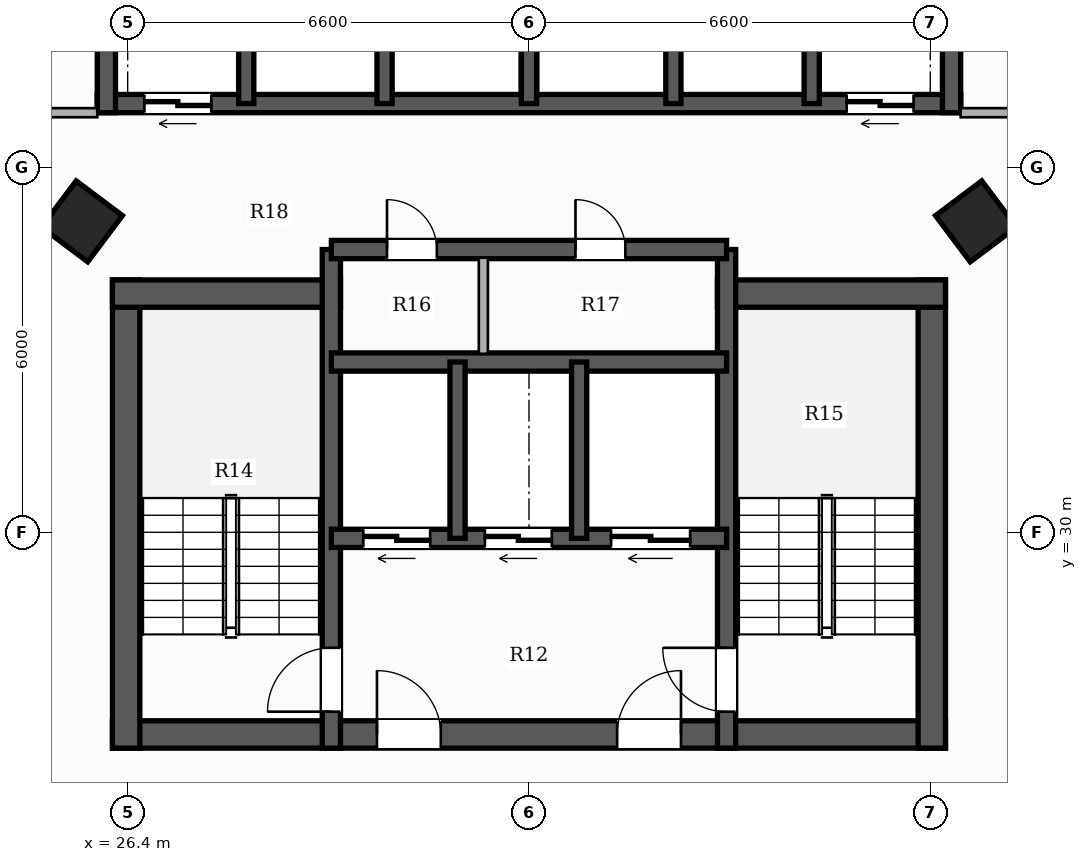
"""IFC4 building model, lengths in metres.
Left out: names, types, materials, properties, quantities, classifications, styles, units other than length and angle.
Written with IfcOpenShell. Run it as: python <this file> out.ifc"""

import sys

from ifc_helpers import new_model, si_unit, direction, frame, frame_2d, origin, origin_2d, place, context, subcontext, project, spatial, rectangle, hollow_rectangle, extrude, element, fill, save


model = new_model("IFC4")
c1 = context("Model", 3, precision=1e-05, world=origin(), true_north=direction((0.0, 1.0)))
c2 = subcontext(c1, "Body", "Model", "MODEL_VIEW")
j1 = project(units=[si_unit("LENGTHUNIT", "METRE"), si_unit("PLANEANGLEUNIT", "RADIAN")], contexts=[c1])
p1 = place(None, origin())
s1 = spatial("IfcSite", under=j1, at=p1, CompositionType="ELEMENT")
p2 = place(p1, origin())
s2 = spatial("IfcBuilding", under=s1, at=p2, CompositionType="ELEMENT")
p3 = place(p2, frame((0.0, 0.0, 84.05)))
s3 = spatial("IfcBuildingStorey", under=s2, at=p3, CompositionType="ELEMENT", Elevation=84.05)
p4 = place(p3, frame((26.15, 26.675, 0.0), z_axis=(0.0, 0.0, 1.0), x_axis=(1.0, 0.0, 0.0)))
e1 = element("IfcWall", 1, at=p4, inside=s3, PredefinedType="SHEAR", context=c2, shape_type="SweptSolid", body=[
    extrude(rectangle(XDim=13.7, YDim=0.45, at=frame_2d((6.85, 0.0))), origin(), (0.0, 0.0, 1.0), 3.3),
])
p5 = place(p4, frame((4.35, 0.0, 0.0)))
e2 = element("IfcOpeningElement", 2, at=p5, cuts=e1, PredefinedType="OPENING", context=c2, shape_type="SweptSolid", body=[
    extrude(rectangle(XDim=1.05, YDim=2.15, at=frame_2d((0.525, 1.075))), frame((0.0, 0.235, 0.0), z_axis=(0.0, -1.0, 0.0), x_axis=(1.0, 0.0, 0.0)), (0.0, 0.0, 1.0), 0.47),
])
p6 = place(p4, frame((8.3, 0.0, 0.0)))
e3 = element("IfcOpeningElement", 3, at=p6, cuts=e1, PredefinedType="OPENING", context=c2, shape_type="SweptSolid", body=[
    extrude(rectangle(XDim=1.05, YDim=2.15, at=frame_2d((0.525, 1.075))), frame((0.0, 0.235, 0.0), z_axis=(0.0, -1.0, 0.0), x_axis=(1.0, 0.0, 0.0)), (0.0, 0.0, 1.0), 0.47),
])
p7 = place(p3, frame((26.375, 26.45, 0.0), z_axis=(0.0, 0.0, 1.0), x_axis=(0.0, 1.0, 0.0)))
e4 = element("IfcWall", 4, at=p7, inside=s3, PredefinedType="SHEAR", context=c2, shape_type="SweptSolid", body=[
    extrude(rectangle(XDim=7.7, YDim=0.45, at=frame_2d((3.85, 0.0))), origin(), (0.0, 0.0, 1.0), 3.3),
])
p8 = place(p3, frame((26.15, 33.925, 0.0), z_axis=(0.0, 0.0, 1.0), x_axis=(1.0, 0.0, 0.0)))
e5 = element("IfcWall", 5, at=p8, inside=s3, PredefinedType="SHEAR", context=c2, shape_type="SweptSolid", body=[
    extrude(rectangle(XDim=3.75, YDim=0.45, at=frame_2d((1.875, 0.0))), origin(), (0.0, 0.0, 1.0), 3.3),
])
p9 = place(p3, frame((39.625, 26.45, 0.0), z_axis=(0.0, 0.0, 1.0), x_axis=(0.0, 1.0, 0.0)))
e6 = element("IfcWall", 6, at=p9, inside=s3, PredefinedType="SHEAR", context=c2, shape_type="SweptSolid", body=[
    extrude(rectangle(XDim=7.7, YDim=0.45, at=frame_2d((3.85, 0.0))), origin(), (0.0, 0.0, 1.0), 3.3),
])
p10 = place(p3, frame((36.1, 33.925, 0.0), z_axis=(0.0, 0.0, 1.0), x_axis=(1.0, 0.0, 0.0)))
e7 = element("IfcWall", 7, at=p10, inside=s3, PredefinedType="SHEAR", context=c2, shape_type="SweptSolid", body=[
    extrude(rectangle(XDim=3.75, YDim=0.45, at=frame_2d((1.875, 0.0))), origin(), (0.0, 0.0, 1.0), 3.3),
])
p11 = place(p3, frame((29.75, 26.45, 0.0), z_axis=(0.0, 0.0, 1.0), x_axis=(0.0, 1.0, 0.0)))
e8 = element("IfcWall", 8, at=p11, inside=s3, PredefinedType="SHEAR", context=c2, shape_type="SweptSolid", body=[
    extrude(rectangle(XDim=8.2, YDim=0.3, at=frame_2d((4.1, 0.0))), origin(), (0.0, 0.0, 1.0), 3.3),
])
p12 = place(p11, frame((0.6, 0.0, 0.0)))
e9 = element("IfcOpeningElement", 9, at=p12, cuts=e8, PredefinedType="OPENING", context=c2, shape_type="SweptSolid", body=[
    extrude(rectangle(XDim=1.05, YDim=2.15, at=frame_2d((0.525, 1.075))), frame((0.0, 0.16, 0.0), z_axis=(0.0, -1.0, 0.0), x_axis=(1.0, 0.0, 0.0)), (0.0, 0.0, 1.0), 0.32),
])
p13 = place(p3, frame((36.25, 26.45, 0.0), z_axis=(0.0, 0.0, 1.0), x_axis=(0.0, 1.0, 0.0)))
e10 = element("IfcWall", 10, at=p13, inside=s3, PredefinedType="SHEAR", context=c2, shape_type="SweptSolid", body=[
    extrude(rectangle(XDim=8.2, YDim=0.3, at=frame_2d((4.1, 0.0))), origin(), (0.0, 0.0, 1.0), 3.3),
])
p14 = place(p13, frame((0.6, 0.0, 0.0)))
e11 = element("IfcOpeningElement", 11, at=p14, cuts=e10, PredefinedType="OPENING", context=c2, shape_type="SweptSolid", body=[
    extrude(rectangle(XDim=1.05, YDim=2.15, at=frame_2d((0.525, 1.075))), frame((0.0, 0.16, 0.0), z_axis=(0.0, -1.0, 0.0), x_axis=(1.0, 0.0, 0.0)), (0.0, 0.0, 1.0), 0.32),
])
p15 = place(p3, frame((36.25, 29.9, 0.0), z_axis=(0.0, 0.0, 1.0), x_axis=(-1.0, 0.0, 0.0)))
e12 = element("IfcWall", 12, at=p15, inside=s3, PredefinedType="SHEAR", context=c2, shape_type="SweptSolid", body=[
    extrude(rectangle(XDim=6.5, YDim=0.3, at=frame_2d((3.25, 0.0))), origin(), (0.0, 0.0, 1.0), 3.3),
])
p16 = place(p15, frame((4.875, 0.0, 0.0)))
e13 = element("IfcOpeningElement", 13, at=p16, cuts=e12, PredefinedType="OPENING", context=c2, shape_type="SweptSolid", body=[
    extrude(rectangle(XDim=1.1, YDim=2.2, at=frame_2d((0.55, 1.1))), frame((0.0, 0.16, 0.0), z_axis=(0.0, -1.0, 0.0), x_axis=(1.0, 0.0, 0.0)), (0.0, 0.0, 1.0), 0.32),
])
p17 = place(p15, frame((2.875, 0.0, 0.0)))
e14 = element("IfcOpeningElement", 14, at=p17, cuts=e12, PredefinedType="OPENING", context=c2, shape_type="SweptSolid", body=[
    extrude(rectangle(XDim=1.1, YDim=2.2, at=frame_2d((0.55, 1.1))), frame((0.0, 0.16, 0.0), z_axis=(0.0, -1.0, 0.0), x_axis=(1.0, 0.0, 0.0)), (0.0, 0.0, 1.0), 0.32),
])
p18 = place(p15, frame((0.6, 0.0, 0.0)))
e15 = element("IfcOpeningElement", 15, at=p18, cuts=e12, PredefinedType="OPENING", context=c2, shape_type="SweptSolid", body=[
    extrude(rectangle(XDim=1.3, YDim=2.2, at=frame_2d((0.65, 1.1))), frame((0.0, 0.16, 0.0), z_axis=(0.0, -1.0, 0.0), x_axis=(1.0, 0.0, 0.0)), (0.0, 0.0, 1.0), 0.32),
])
p19 = place(p3, frame((29.75, 32.8, 0.0), z_axis=(0.0, 0.0, 1.0), x_axis=(1.0, 0.0, 0.0)))
e16 = element("IfcWall", 16, at=p19, inside=s3, PredefinedType="SHEAR", context=c2, shape_type="SweptSolid", body=[
    extrude(rectangle(XDim=6.5, YDim=0.3, at=frame_2d((3.25, 0.0))), origin(), (0.0, 0.0, 1.0), 3.3),
])
for number, where, z_axis, x_axis in (
    (17, (31.825, 29.9, 0.0), (0.0, 0.0, 1.0), (0.0, 1.0, 0.0)),
    (18, (33.825, 29.9, 0.0), (0.0, 0.0, 1.0), (0.0, 1.0, 0.0)),
):
    element("IfcWall", number, at=place(p3, frame(where, z_axis=z_axis, x_axis=x_axis)), inside=s3, PredefinedType="SHEAR", context=c2, shape_type="SweptSolid", body=[
        extrude(rectangle(XDim=2.9, YDim=0.25, at=frame_2d((1.45, 0.0))), origin(), (0.0, 0.0, 1.0), 3.3),
    ])
p20 = place(p3, frame((29.75, 34.65, 0.0), z_axis=(0.0, 0.0, 1.0), x_axis=(1.0, 0.0, 0.0)))
e19 = element("IfcWall", 19, at=p20, inside=s3, PredefinedType="SHEAR", context=c2, shape_type="SweptSolid", body=[
    extrude(rectangle(XDim=6.5, YDim=0.3, at=frame_2d((3.25, 0.0))), origin(), (0.0, 0.0, 1.0), 3.3),
])
p21 = place(p20, frame((0.915, 0.0, 0.0)))
e20 = element("IfcOpeningElement", 20, at=p21, cuts=e19, PredefinedType="OPENING", context=c2, shape_type="SweptSolid", body=[
    extrude(rectangle(XDim=0.82, YDim=2.1, at=frame_2d((0.41, 1.05))), frame((0.0, 0.16, 0.0), z_axis=(0.0, -1.0, 0.0), x_axis=(1.0, 0.0, 0.0)), (0.0, 0.0, 1.0), 0.32),
])
p22 = place(p20, frame((4.015, 0.0, 0.0)))
e21 = element("IfcOpeningElement", 21, at=p22, cuts=e19, PredefinedType="OPENING", context=c2, shape_type="SweptSolid", body=[
    extrude(rectangle(XDim=0.82, YDim=2.1, at=frame_2d((0.41, 1.05))), frame((0.0, 0.16, 0.0), z_axis=(0.0, -1.0, 0.0), x_axis=(1.0, 0.0, 0.0)), (0.0, 0.0, 1.0), 0.32),
])
p23 = place(p3, frame((40.1, 37.05, 0.0), z_axis=(0.0, 0.0, 1.0), x_axis=(-1.0, 0.0, 0.0)))
e22 = element("IfcWall", 22, at=p23, inside=s3, PredefinedType="SHEAR", context=c2, shape_type="SweptSolid", body=[
    extrude(rectangle(XDim=14.2, YDim=0.3, at=frame_2d((7.1, 0.0))), origin(), (0.0, 0.0, 1.0), 3.3),
])
p24 = place(p23, frame((12.325, 0.0, 0.0)))
e23 = element("IfcOpeningElement", 23, at=p24, cuts=e22, PredefinedType="OPENING", context=c2, shape_type="SweptSolid", body=[
    extrude(rectangle(XDim=1.1, YDim=2.2, at=frame_2d((0.55, 1.1))), frame((0.0, 0.16, 0.0), z_axis=(0.0, -1.0, 0.0), x_axis=(1.0, 0.0, 0.0)), (0.0, 0.0, 1.0), 0.32),
])
p25 = place(p23, frame((0.775, 0.0, 0.0)))
e24 = element("IfcOpeningElement", 24, at=p25, cuts=e22, PredefinedType="OPENING", context=c2, shape_type="SweptSolid", body=[
    extrude(rectangle(XDim=1.1, YDim=2.2, at=frame_2d((0.55, 1.1))), frame((0.0, 0.16, 0.0), z_axis=(0.0, -1.0, 0.0), x_axis=(1.0, 0.0, 0.0)), (0.0, 0.0, 1.0), 0.32),
])
for number, where, z_axis, x_axis in (
    (25, (26.05, 36.9, 0.0), (0.0, 0.0, 1.0), (0.0, 1.0, 0.0)),
    (26, (39.95, 36.9, 0.0), (0.0, 0.0, 1.0), (0.0, 1.0, 0.0)),
):
    element("IfcWall", number, at=place(p3, frame(where, z_axis=z_axis, x_axis=x_axis)), inside=s3, PredefinedType="SHEAR", context=c2, shape_type="SweptSolid", body=[
        extrude(rectangle(XDim=2.85, YDim=0.3, at=frame_2d((1.425, 0.0))), origin(), (0.0, 0.0, 1.0), 3.3),
    ])
for number, where, z_axis, x_axis in (
    (27, (28.35, 37.05, 0.0), (0.0, 0.0, 1.0), (0.0, 1.0, 0.0)),
    (28, (30.625, 37.05, 0.0), (0.0, 0.0, 1.0), (0.0, 1.0, 0.0)),
    (29, (33.0, 37.05, 0.0), (0.0, 0.0, 1.0), (0.0, 1.0, 0.0)),
    (30, (35.375, 37.05, 0.0), (0.0, 0.0, 1.0), (0.0, 1.0, 0.0)),
    (31, (37.65, 37.05, 0.0), (0.0, 0.0, 1.0), (0.0, 1.0, 0.0)),
):
    element("IfcWall", number, at=place(p3, frame(where, z_axis=z_axis, x_axis=x_axis)), inside=s3, PredefinedType="SHEAR", context=c2, shape_type="SweptSolid", body=[
        extrude(rectangle(XDim=2.55, YDim=0.25, at=frame_2d((1.275, 0.0))), origin(), (0.0, 0.0, 1.0), 3.3),
    ])
for number, where, z_axis, x_axis in (
    (32, (25.648, 35.113, 0.0), (0.0, 0.0, 1.0), (0.6, 0.8, 0.0)),
    (33, (40.352, 35.113, 0.0), (0.0, 0.0, 1.0), (-0.6, 0.8, 0.0)),
):
    element("IfcColumn", number, at=place(p3, frame(where, z_axis=z_axis, x_axis=x_axis)), inside=s3, PredefinedType="COLUMN", context=c2, shape_type="SweptSolid", body=[
        extrude(hollow_rectangle(XDim=0.95, YDim=0.95, WallThickness=0.032, at=origin_2d()), origin(), (0.0, 0.0, 1.0), 3.3),
    ])
p26 = place(p3, frame((32.25, 32.935, 0.0), z_axis=(0.0, 0.0, 1.0), x_axis=(0.0, 1.0, 0.0)))
e34 = element("IfcWall", 34, at=p26, inside=s3, PredefinedType="PARTITIONING", context=c2, shape_type="SweptSolid", body=[
    extrude(rectangle(XDim=1.58, YDim=0.15, at=frame_2d((0.79, 0.0))), origin(), (0.0, 0.0, 1.0), 3.06),
])
p27 = place(p3, frame((40.1, 36.9, 0.0), z_axis=(0.0, 0.0, 1.0), x_axis=(1.0, 0.0, 0.0)))
e35 = element("IfcWall", 35, at=p27, inside=s3, PredefinedType="PARTITIONING", context=c2, shape_type="SweptSolid", body=[
    extrude(rectangle(XDim=2.55, YDim=0.15, at=frame_2d((1.275, 0.0))), origin(), (0.0, 0.0, 1.0), 2.413),
])
p28 = place(p3, frame((23.41, 36.9, 0.0), z_axis=(0.0, 0.0, 1.0), x_axis=(1.0, 0.0, 0.0)))
e36 = element("IfcWall", 36, at=p28, inside=s3, PredefinedType="PARTITIONING", context=c2, shape_type="SweptSolid", body=[
    extrude(rectangle(XDim=2.49, YDim=0.15, at=frame_2d((1.245, 0.0))), origin(), (0.0, 0.0, 1.0), 2.413),
])
p29 = place(p12, origin())
e37 = element("IfcDoor", 37, at=p29, inside=s3, OperationType="SINGLE_SWING_LEFT", PredefinedType="DOOR", context=c2, shape_type="SweptSolid", body=[
    extrude(rectangle(XDim=1.05, YDim=2.15, at=frame_2d((0.525, 1.075))), frame((0.0, 0.025, 0.0), z_axis=(0.0, -1.0, 0.0), x_axis=(1.0, 0.0, 0.0)), (0.0, 0.0, 1.0), 0.05),
])
fill(e9, e37)
p30 = place(p14, origin())
e38 = element("IfcDoor", 38, at=p30, inside=s3, OperationType="SINGLE_SWING_RIGHT", PredefinedType="DOOR", context=c2, shape_type="SweptSolid", body=[
    extrude(rectangle(XDim=1.05, YDim=2.15, at=frame_2d((0.525, 1.075))), frame((0.0, 0.025, 0.0), z_axis=(0.0, -1.0, 0.0), x_axis=(1.0, 0.0, 0.0)), (0.0, 0.0, 1.0), 0.05),
])
fill(e11, e38)
p31 = place(p5, origin())
e39 = element("IfcDoor", 39, at=p31, inside=s3, OperationType="SINGLE_SWING_LEFT", PredefinedType="DOOR", context=c2, shape_type="SweptSolid", body=[
    extrude(rectangle(XDim=1.05, YDim=2.15, at=frame_2d((0.525, 1.075))), frame((0.0, 0.025, 0.0), z_axis=(0.0, -1.0, 0.0), x_axis=(1.0, 0.0, 0.0)), (0.0, 0.0, 1.0), 0.05),
])
fill(e2, e39)
p32 = place(p6, origin())
e40 = element("IfcDoor", 40, at=p32, inside=s3, OperationType="SINGLE_SWING_RIGHT", PredefinedType="DOOR", context=c2, shape_type="SweptSolid", body=[
    extrude(rectangle(XDim=1.05, YDim=2.15, at=frame_2d((0.525, 1.075))), frame((0.0, 0.025, 0.0), z_axis=(0.0, -1.0, 0.0), x_axis=(1.0, 0.0, 0.0)), (0.0, 0.0, 1.0), 0.05),
])
fill(e3, e40)
p33 = place(p16, origin())
e41 = element("IfcDoor", 41, at=p33, inside=s3, OperationType="DOUBLE_DOOR_SLIDING", PredefinedType="DOOR", context=c2, shape_type="SweptSolid", body=[
    extrude(rectangle(XDim=1.1, YDim=2.2, at=frame_2d((0.55, 1.1))), frame((0.0, 0.025, 0.0), z_axis=(0.0, -1.0, 0.0), x_axis=(1.0, 0.0, 0.0)), (0.0, 0.0, 1.0), 0.05),
])
fill(e13, e41)
p34 = place(p17, origin())
e42 = element("IfcDoor", 42, at=p34, inside=s3, OperationType="DOUBLE_DOOR_SLIDING", PredefinedType="DOOR", context=c2, shape_type="SweptSolid", body=[
    extrude(rectangle(XDim=1.1, YDim=2.2, at=frame_2d((0.55, 1.1))), frame((0.0, 0.025, 0.0), z_axis=(0.0, -1.0, 0.0), x_axis=(1.0, 0.0, 0.0)), (0.0, 0.0, 1.0), 0.05),
])
fill(e14, e42)
p35 = place(p18, origin())
e43 = element("IfcDoor", 43, at=p35, inside=s3, OperationType="DOUBLE_DOOR_SLIDING", PredefinedType="DOOR", context=c2, shape_type="SweptSolid", body=[
    extrude(rectangle(XDim=1.3, YDim=2.2, at=frame_2d((0.65, 1.1))), frame((0.0, 0.025, 0.0), z_axis=(0.0, -1.0, 0.0), x_axis=(1.0, 0.0, 0.0)), (0.0, 0.0, 1.0), 0.05),
])
fill(e15, e43)
p36 = place(p24, origin())
e44 = element("IfcDoor", 44, at=p36, inside=s3, OperationType="DOUBLE_DOOR_SLIDING", PredefinedType="DOOR", context=c2, shape_type="SweptSolid", body=[
    extrude(rectangle(XDim=1.1, YDim=2.2, at=frame_2d((0.55, 1.1))), frame((0.0, 0.025, 0.0), z_axis=(0.0, -1.0, 0.0), x_axis=(1.0, 0.0, 0.0)), (0.0, 0.0, 1.0), 0.05),
])
fill(e23, e44)
p37 = place(p25, origin())
e45 = element("IfcDoor", 45, at=p37, inside=s3, OperationType="DOUBLE_DOOR_SLIDING", PredefinedType="DOOR", context=c2, shape_type="SweptSolid", body=[
    extrude(rectangle(XDim=1.1, YDim=2.2, at=frame_2d((0.55, 1.1))), frame((0.0, 0.025, 0.0), z_axis=(0.0, -1.0, 0.0), x_axis=(1.0, 0.0, 0.0)), (0.0, 0.0, 1.0), 0.05),
])
fill(e24, e45)
p38 = place(p21, origin())
e46 = element("IfcDoor", 46, at=p38, inside=s3, OperationType="SINGLE_SWING_LEFT", PredefinedType="DOOR", context=c2, shape_type="SweptSolid", body=[
    extrude(rectangle(XDim=0.82, YDim=2.1, at=frame_2d((0.41, 1.05))), frame((0.0, 0.025, 0.0), z_axis=(0.0, -1.0, 0.0), x_axis=(1.0, 0.0, 0.0)), (0.0, 0.0, 1.0), 0.05),
])
fill(e20, e46)
p39 = place(p22, origin())
e47 = element("IfcDoor", 47, at=p39, inside=s3, OperationType="SINGLE_SWING_LEFT", PredefinedType="DOOR", context=c2, shape_type="SweptSolid", body=[
    extrude(rectangle(XDim=0.82, YDim=2.1, at=frame_2d((0.41, 1.05))), frame((0.0, 0.025, 0.0), z_axis=(0.0, -1.0, 0.0), x_axis=(1.0, 0.0, 0.0)), (0.0, 0.0, 1.0), 0.05),
])
fill(e21, e47)
save(model, sys.argv[1])
